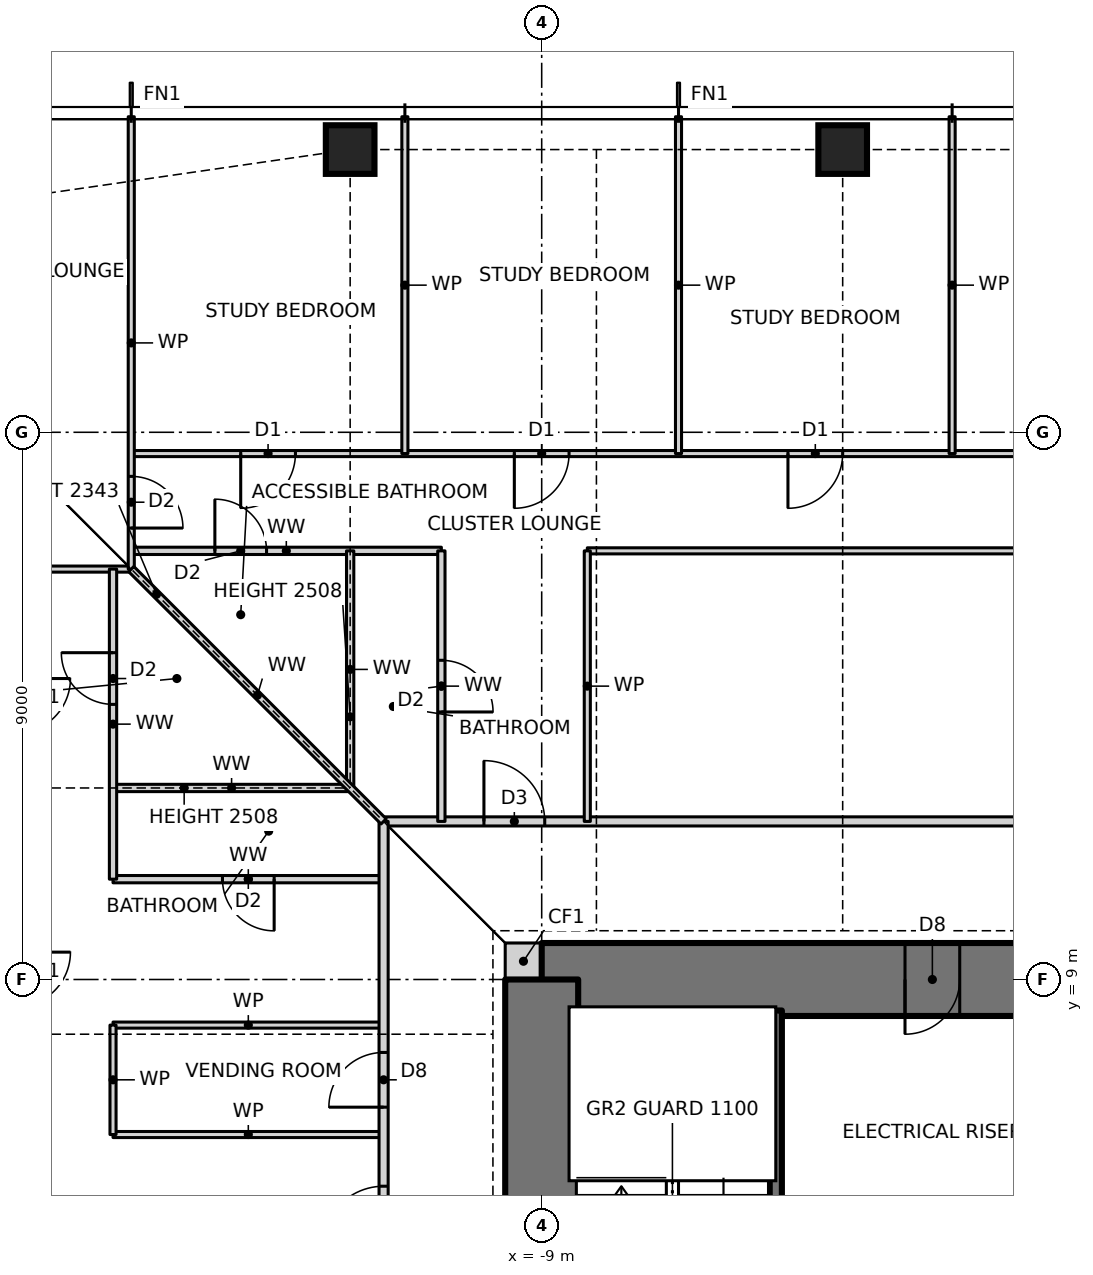
"""IFC4 building model, lengths in metres.
Left out: names, types, materials, properties, quantities, classifications, styles, units other than length and angle.
Written with IfcOpenShell. Run it as: python <this file> out.ifc"""

import sys

from ifc_helpers import new_model, si_unit, direction, frame, frame_2d, origin, origin_2d, place, context, subcontext, project, spatial, rectangle, hollow_rectangle, extrude, element, fill, save


model = new_model("IFC4")
c1 = context("Model", 3, precision=1e-05, world=origin(), true_north=direction((0.0, 1.0)))
c2 = subcontext(c1, "Body", "Model", "MODEL_VIEW")
j1 = project(units=[si_unit("LENGTHUNIT", "METRE"), si_unit("PLANEANGLEUNIT", "RADIAN")], contexts=[c1])
p1 = place(None, origin())
s1 = spatial("IfcSite", under=j1, at=p1, CompositionType="ELEMENT")
p2 = place(p1, origin())
s2 = spatial("IfcBuilding", under=s1, at=p2, CompositionType="ELEMENT")
p3 = place(p2, frame((0.0, 0.0, 15.0)))
s3 = spatial("IfcBuildingStorey", under=s2, at=p3, CompositionType="ELEMENT", Elevation=15.0)
for number, where, z_axis, x_axis in (
    (1, (-4.05, 22.65, 0.0), (0.0, 0.0, 1.0), (1.0, 0.0, 0.0)),
    (2, (-12.15, 22.65, 0.0), (0.0, 0.0, 1.0), (1.0, 0.0, 0.0)),
):
    element("IfcColumn", number, at=place(p3, frame(where, z_axis=z_axis, x_axis=x_axis)), inside=s3, PredefinedType="COLUMN", context=c2, shape_type="SweptSolid", body=[
        extrude(hollow_rectangle(XDim=0.8, YDim=0.8, WallThickness=0.09, at=origin_2d()), origin(), (0.0, 0.0, 1.0), 3.5),
    ])
p4 = place(p3, frame((-9.6, 9.3, 0.0), z_axis=(0.0, 0.0, 1.0), x_axis=(1.0, 0.0, 0.0)))
e3 = element("IfcWall", 3, at=p4, inside=s3, PredefinedType="SOLIDWALL", context=c2, shape_type="SweptSolid", body=[
    extrude(rectangle(XDim=0.6, YDim=0.6, at=frame_2d((0.3, 0.0))), origin(), (0.0, 0.0, 1.0), 3.5),
])
p5 = place(p3, frame((9.0, 9.0, 0.0), z_axis=(0.0, 0.0, 1.0), x_axis=(-1.0, 0.0, 0.0)))
e4 = element("IfcWall", 4, at=p5, inside=s3, PredefinedType="SHEAR", context=c2, shape_type="SweptSolid", body=[
    extrude(rectangle(XDim=18.0, YDim=1.2, at=frame_2d((9.0, 0.0))), origin(), (0.0, 0.0, 1.0), 3.5),
])
p6 = place(p5, frame((11.125, 0.0, 0.0)))
e5 = element("IfcOpeningElement", 5, at=p6, cuts=e4, PredefinedType="OPENING", context=c2, shape_type="SweptSolid", body=[
    extrude(rectangle(XDim=0.9, YDim=2.1, at=frame_2d((0.45, 1.05))), frame((0.0, 0.61, 0.0), z_axis=(0.0, -1.0, 0.0), x_axis=(1.0, 0.0, 0.0)), (0.0, 0.0, 1.0), 1.22),
])
p7 = place(p5, frame((4.275, 0.0, 0.0)))
e6 = element("IfcOpeningElement", 6, at=p7, cuts=e4, PredefinedType="OPENING", context=c2, shape_type="SweptSolid", body=[
    extrude(rectangle(XDim=0.9, YDim=2.1, at=frame_2d((0.45, 1.05))), frame((0.0, 0.61, 0.0), z_axis=(0.0, -1.0, 0.0), x_axis=(1.0, 0.0, 0.0)), (0.0, 0.0, 1.0), 1.22),
])
p8 = place(p3, frame((-9.0, 9.0, 0.0), z_axis=(0.0, 0.0, 1.0), x_axis=(0.0, -1.0, 0.0)))
e7 = element("IfcWall", 7, at=p8, inside=s3, PredefinedType="SHEAR", context=c2, shape_type="SweptSolid", body=[
    extrude(rectangle(XDim=18.0, YDim=1.2, at=frame_2d((9.0, 0.0))), origin(), (0.0, 0.0, 1.0), 3.5),
])
p9 = place(p8, frame((8.5, 0.0, 0.0)))
e8 = element("IfcOpeningElement", 8, at=p9, cuts=e7, PredefinedType="OPENING", context=c2, shape_type="SweptSolid", body=[
    extrude(rectangle(XDim=1.0, YDim=2.1, at=frame_2d((0.5, 1.05))), frame((0.0, 0.61, 0.0), z_axis=(0.0, -1.0, 0.0), x_axis=(1.0, 0.0, 0.0)), (0.0, 0.0, 1.0), 1.22),
])
for number, where, z_axis, x_axis in (
    (9, (-16.05, 6.45, 0.0), (0.0, 0.0, 1.0), (1.0, 0.0, 0.0)),
    (10, (-16.05, 8.25, 0.0), (0.0, 0.0, 1.0), (1.0, 0.0, 0.0)),
):
    element("IfcWall", number, at=place(p3, frame(where, z_axis=z_axis, x_axis=x_axis)), inside=s3, PredefinedType="PARTITIONING", context=c2, shape_type="SweptSolid", body=[
        extrude(rectangle(XDim=4.45, YDim=0.1, at=frame_2d((2.225, 0.0))), origin(), (0.0, 0.0, 1.0), 3.27),
    ])
p10 = place(p3, frame((-16.05, 10.65, 0.0), z_axis=(0.0, 0.0, 1.0), x_axis=(1.0, 0.0, 0.0)))
e11 = element("IfcWall", 11, at=p10, inside=s3, PredefinedType="PARTITIONING", context=c2, shape_type="SweptSolid", body=[
    extrude(rectangle(XDim=4.45, YDim=0.12, at=frame_2d((2.225, 0.0))), origin(), (0.0, 0.0, 1.0), 3.27),
])
p11 = place(p10, frame((1.8, 0.0, 0.0)))
e12 = element("IfcOpeningElement", 12, at=p11, cuts=e11, PredefinedType="OPENING", context=c2, shape_type="SweptSolid", body=[
    extrude(rectangle(XDim=0.85, YDim=2.1, at=frame_2d((0.425, 1.05))), frame((0.0, 0.07, 0.0), z_axis=(0.0, -1.0, 0.0), x_axis=(1.0, 0.0, 0.0)), (0.0, 0.0, 1.0), 0.14),
])
p12 = place(p3, frame((-11.6, 11.6, 0.0), z_axis=(0.0, 0.0, 1.0), x_axis=(1.0, 0.0, 0.0)))
e13 = element("IfcWall", 13, at=p12, inside=s3, PredefinedType="PARTITIONING", context=c2, shape_type="SweptSolid", body=[
    extrude(rectangle(XDim=23.2, YDim=0.15, at=frame_2d((11.6, 0.0))), origin(), (0.0, 0.0, 1.0), 3.27),
])
p13 = place(p12, frame((1.65, 0.0, 0.0)))
e14 = element("IfcOpeningElement", 14, at=p13, cuts=e13, PredefinedType="OPENING", context=c2, shape_type="SweptSolid", body=[
    extrude(rectangle(XDim=1.0, YDim=2.1, at=frame_2d((0.5, 1.05))), frame((0.0, 0.085, 0.0), z_axis=(0.0, -1.0, 0.0), x_axis=(1.0, 0.0, 0.0)), (0.0, 0.0, 1.0), 0.17),
])
p14 = place(p3, frame((-16.05, 12.15, 0.0), z_axis=(0.0, 0.0, 1.0), x_axis=(1.0, 0.0, 0.0)))
e15 = element("IfcWall", 15, at=p14, inside=s3, PredefinedType="PARTITIONING", context=c2, shape_type="SweptSolid", body=[
    extrude(rectangle(XDim=3.9, YDim=0.12, at=frame_2d((1.95, 0.0))), origin(), (0.0, 0.0, 1.0), 2.508),
])
p15 = place(p3, frame((-23.19, 15.75, 0.0), z_axis=(0.0, 0.0, 1.0), x_axis=(1.0, 0.0, 0.0)))
e16 = element("IfcWall", 16, at=p15, inside=s3, PredefinedType="PARTITIONING", context=c2, shape_type="SweptSolid", body=[
    extrude(rectangle(XDim=7.44, YDim=0.1, at=frame_2d((3.72, 0.0))), origin(), (0.0, 0.0, 1.0), 3.27),
])
p16 = place(p3, frame((-15.75, 16.05, 0.0), z_axis=(0.0, 0.0, 1.0), x_axis=(1.0, 0.0, 0.0)))
e17 = element("IfcWall", 17, at=p16, inside=s3, PredefinedType="PARTITIONING", context=c2, shape_type="SweptSolid", body=[
    extrude(rectangle(XDim=5.1, YDim=0.12, at=frame_2d((2.55, 0.0))), origin(), (0.0, 0.0, 1.0), 3.27),
])
p17 = place(p16, frame((1.375, 0.0, 0.0)))
e18 = element("IfcOpeningElement", 18, at=p17, cuts=e17, PredefinedType="OPENING", context=c2, shape_type="SweptSolid", body=[
    extrude(rectangle(XDim=0.85, YDim=2.1, at=frame_2d((0.425, 1.05))), frame((0.0, 0.07, 0.0), z_axis=(0.0, -1.0, 0.0), x_axis=(1.0, 0.0, 0.0)), (0.0, 0.0, 1.0), 0.14),
])
p18 = place(p3, frame((-8.25, 16.05, 0.0), z_axis=(0.0, 0.0, 1.0), x_axis=(1.0, 0.0, 0.0)))
e19 = element("IfcWall", 19, at=p18, inside=s3, PredefinedType="PARTITIONING", context=c2, shape_type="SweptSolid", body=[
    extrude(rectangle(XDim=20.2, YDim=0.1, at=frame_2d((10.1, 0.0))), origin(), (0.0, 0.0, 1.0), 3.27),
])
p19 = place(p18, frame((9.675, 0.0, 0.0)))
e20 = element("IfcOpeningElement", 20, at=p19, cuts=e19, PredefinedType="OPENING", context=c2, shape_type="SweptSolid", body=[
    extrude(rectangle(XDim=0.85, YDim=2.1, at=frame_2d((0.425, 1.05))), frame((0.0, 0.06, 0.0), z_axis=(0.0, -1.0, 0.0), x_axis=(1.0, 0.0, 0.0)), (0.0, 0.0, 1.0), 0.12),
])
p20 = place(p3, frame((-15.75, 17.65, 0.0), z_axis=(0.0, 0.0, 1.0), x_axis=(1.0, 0.0, 0.0)))
e21 = element("IfcWall", 21, at=p20, inside=s3, PredefinedType="PARTITIONING", context=c2, shape_type="SweptSolid", body=[
    extrude(rectangle(XDim=31.5, YDim=0.1, at=frame_2d((15.75, 0.0))), origin(), (0.0, 0.0, 1.0), 3.27),
])
p21 = place(p20, frame((28.8, 0.0, 0.0)))
e22 = element("IfcOpeningElement", 22, at=p21, cuts=e21, PredefinedType="OPENING", context=c2, shape_type="SweptSolid", body=[
    extrude(rectangle(XDim=0.9, YDim=2.1, at=frame_2d((0.45, 1.05))), frame((0.0, 0.06, 0.0), z_axis=(0.0, -1.0, 0.0), x_axis=(1.0, 0.0, 0.0)), (0.0, 0.0, 1.0), 0.12),
])
p22 = place(p20, frame((24.3, 0.0, 0.0)))
e23 = element("IfcOpeningElement", 23, at=p22, cuts=e21, PredefinedType="OPENING", context=c2, shape_type="SweptSolid", body=[
    extrude(rectangle(XDim=0.9, YDim=2.1, at=frame_2d((0.45, 1.05))), frame((0.0, 0.06, 0.0), z_axis=(0.0, -1.0, 0.0), x_axis=(1.0, 0.0, 0.0)), (0.0, 0.0, 1.0), 0.12),
])
p23 = place(p20, frame((19.8, 0.0, 0.0)))
e24 = element("IfcOpeningElement", 24, at=p23, cuts=e21, PredefinedType="OPENING", context=c2, shape_type="SweptSolid", body=[
    extrude(rectangle(XDim=0.9, YDim=2.1, at=frame_2d((0.45, 1.05))), frame((0.0, 0.06, 0.0), z_axis=(0.0, -1.0, 0.0), x_axis=(1.0, 0.0, 0.0)), (0.0, 0.0, 1.0), 0.12),
])
p24 = place(p20, frame((15.3, 0.0, 0.0)))
e25 = element("IfcOpeningElement", 25, at=p24, cuts=e21, PredefinedType="OPENING", context=c2, shape_type="SweptSolid", body=[
    extrude(rectangle(XDim=0.9, YDim=2.1, at=frame_2d((0.45, 1.05))), frame((0.0, 0.06, 0.0), z_axis=(0.0, -1.0, 0.0), x_axis=(1.0, 0.0, 0.0)), (0.0, 0.0, 1.0), 0.12),
])
p25 = place(p20, frame((10.8, 0.0, 0.0)))
e26 = element("IfcOpeningElement", 26, at=p25, cuts=e21, PredefinedType="OPENING", context=c2, shape_type="SweptSolid", body=[
    extrude(rectangle(XDim=0.9, YDim=2.1, at=frame_2d((0.45, 1.05))), frame((0.0, 0.06, 0.0), z_axis=(0.0, -1.0, 0.0), x_axis=(1.0, 0.0, 0.0)), (0.0, 0.0, 1.0), 0.12),
])
p26 = place(p20, frame((6.3, 0.0, 0.0)))
e27 = element("IfcOpeningElement", 27, at=p26, cuts=e21, PredefinedType="OPENING", context=c2, shape_type="SweptSolid", body=[
    extrude(rectangle(XDim=0.9, YDim=2.1, at=frame_2d((0.45, 1.05))), frame((0.0, 0.06, 0.0), z_axis=(0.0, -1.0, 0.0), x_axis=(1.0, 0.0, 0.0)), (0.0, 0.0, 1.0), 0.12),
])
p27 = place(p20, frame((1.8, 0.0, 0.0)))
e28 = element("IfcOpeningElement", 28, at=p27, cuts=e21, PredefinedType="OPENING", context=c2, shape_type="SweptSolid", body=[
    extrude(rectangle(XDim=0.9, YDim=2.1, at=frame_2d((0.45, 1.05))), frame((0.0, 0.06, 0.0), z_axis=(0.0, -1.0, 0.0), x_axis=(1.0, 0.0, 0.0)), (0.0, 0.0, 1.0), 0.12),
])
p28 = place(p3, frame((-2.25, 17.65, 0.0), z_axis=(0.0, 0.0, 1.0), x_axis=(0.0, 1.0, 0.0)))
e29 = element("IfcWall", 29, at=p28, inside=s3, PredefinedType="PARTITIONING", context=c2, shape_type="SweptSolid", body=[
    extrude(rectangle(XDim=5.54, YDim=0.1, at=frame_2d((2.77, 0.0))), origin(), (0.0, 0.0, 1.0), 3.27),
])
p29 = place(p3, frame((-5.15, 1.6, 0.0), z_axis=(0.0, 0.0, 1.0), x_axis=(0.0, 1.0, 0.0)))
e30 = element("IfcWall", 30, at=p29, inside=s3, PredefinedType="SOLIDWALL", context=c2, shape_type="SweptSolid", body=[
    extrude(rectangle(XDim=6.89, YDim=0.2, at=frame_2d((3.445, 0.0))), origin(), (0.0, 0.0, 1.0), 3.5),
])
p30 = place(p3, frame((-6.75, 17.65, 0.0), z_axis=(0.0, 0.0, 1.0), x_axis=(0.0, 1.0, 0.0)))
e31 = element("IfcWall", 31, at=p30, inside=s3, PredefinedType="PARTITIONING", context=c2, shape_type="SweptSolid", body=[
    extrude(rectangle(XDim=5.54, YDim=0.1, at=frame_2d((2.77, 0.0))), origin(), (0.0, 0.0, 1.0), 3.27),
])
p31 = place(p3, frame((-8.25, 11.6, 0.0), z_axis=(0.0, 0.0, 1.0), x_axis=(0.0, 1.0, 0.0)))
e32 = element("IfcWall", 32, at=p31, inside=s3, PredefinedType="PARTITIONING", context=c2, shape_type="SweptSolid", body=[
    extrude(rectangle(XDim=4.45, YDim=0.1, at=frame_2d((2.225, 0.0))), origin(), (0.0, 0.0, 1.0), 3.27),
])
p32 = place(p3, frame((-10.65, 11.6, 0.0), z_axis=(0.0, 0.0, 1.0), x_axis=(0.0, 1.0, 0.0)))
e33 = element("IfcWall", 33, at=p32, inside=s3, PredefinedType="PARTITIONING", context=c2, shape_type="SweptSolid", body=[
    extrude(rectangle(XDim=4.45, YDim=0.12, at=frame_2d((2.225, 0.0))), origin(), (0.0, 0.0, 1.0), 3.27),
])
p33 = place(p32, frame((1.8, 0.0, 0.0)))
e34 = element("IfcOpeningElement", 34, at=p33, cuts=e33, PredefinedType="OPENING", context=c2, shape_type="SweptSolid", body=[
    extrude(rectangle(XDim=0.85, YDim=2.1, at=frame_2d((0.425, 1.05))), frame((0.0, 0.07, 0.0), z_axis=(0.0, -1.0, 0.0), x_axis=(1.0, 0.0, 0.0)), (0.0, 0.0, 1.0), 0.14),
])
p34 = place(p3, frame((-11.25, 17.65, 0.0), z_axis=(0.0, 0.0, 1.0), x_axis=(0.0, 1.0, 0.0)))
e35 = element("IfcWall", 35, at=p34, inside=s3, PredefinedType="PARTITIONING", context=c2, shape_type="SweptSolid", body=[
    extrude(rectangle(XDim=5.54, YDim=0.1, at=frame_2d((2.77, 0.0))), origin(), (0.0, 0.0, 1.0), 3.27),
])
p35 = place(p3, frame((-11.6, -12.6, 0.0), z_axis=(0.0, 0.0, 1.0), x_axis=(0.0, 1.0, 0.0)))
e36 = element("IfcWall", 36, at=p35, inside=s3, PredefinedType="PARTITIONING", context=c2, shape_type="SweptSolid", body=[
    extrude(rectangle(XDim=24.2, YDim=0.15, at=frame_2d((12.1, 0.0))), origin(), (0.0, 0.0, 1.0), 3.27),
])
p36 = place(p35, frame((17.2, 0.0, 0.0)))
e37 = element("IfcOpeningElement", 37, at=p36, cuts=e36, PredefinedType="OPENING", context=c2, shape_type="SweptSolid", body=[
    extrude(rectangle(XDim=1.0, YDim=2.1, at=frame_2d((0.5, 1.05))), frame((0.0, 0.085, 0.0), z_axis=(0.0, -1.0, 0.0), x_axis=(1.0, 0.0, 0.0)), (0.0, 0.0, 1.0), 0.17),
])
p37 = place(p35, frame((19.5, 0.0, 0.0)))
e38 = element("IfcOpeningElement", 38, at=p37, cuts=e36, PredefinedType="OPENING", context=c2, shape_type="SweptSolid", body=[
    extrude(rectangle(XDim=0.9, YDim=2.1, at=frame_2d((0.45, 1.05))), frame((0.0, 0.085, 0.0), z_axis=(0.0, -1.0, 0.0), x_axis=(1.0, 0.0, 0.0)), (0.0, 0.0, 1.0), 0.17),
])
p38 = place(p3, frame((-12.15, 12.15, 0.0), z_axis=(0.0, 0.0, 1.0), x_axis=(0.0, 1.0, 0.0)))
e39 = element("IfcWall", 39, at=p38, inside=s3, PredefinedType="PARTITIONING", context=c2, shape_type="SweptSolid", body=[
    extrude(rectangle(XDim=3.9, YDim=0.12, at=frame_2d((1.95, 0.0))), origin(), (0.0, 0.0, 1.0), 2.508),
])
p39 = place(p3, frame((-15.75, 15.75, 0.0), z_axis=(0.0, 0.0, 1.0), x_axis=(0.0, 1.0, 0.0)))
e40 = element("IfcWall", 40, at=p39, inside=s3, PredefinedType="PARTITIONING", context=c2, shape_type="SweptSolid", body=[
    extrude(rectangle(XDim=7.44, YDim=0.1, at=frame_2d((3.72, 0.0))), origin(), (0.0, 0.0, 1.0), 3.27),
])
p40 = place(p39, frame((0.675, 0.0, 0.0)))
e41 = element("IfcOpeningElement", 41, at=p40, cuts=e40, PredefinedType="OPENING", context=c2, shape_type="SweptSolid", body=[
    extrude(rectangle(XDim=0.85, YDim=2.1, at=frame_2d((0.425, 1.05))), frame((0.0, 0.06, 0.0), z_axis=(0.0, -1.0, 0.0), x_axis=(1.0, 0.0, 0.0)), (0.0, 0.0, 1.0), 0.12),
])
p41 = place(p3, frame((-16.05, 6.45, 0.0), z_axis=(0.0, 0.0, 1.0), x_axis=(0.0, 1.0, 0.0)))
e42 = element("IfcWall", 42, at=p41, inside=s3, PredefinedType="PARTITIONING", context=c2, shape_type="SweptSolid", body=[
    extrude(rectangle(XDim=1.8, YDim=0.1, at=frame_2d((0.9, 0.0))), origin(), (0.0, 0.0, 1.0), 3.27),
])
p42 = place(p3, frame((-16.05, 10.65, 0.0), z_axis=(0.0, 0.0, 1.0), x_axis=(0.0, 1.0, 0.0)))
e43 = element("IfcWall", 43, at=p42, inside=s3, PredefinedType="PARTITIONING", context=c2, shape_type="SweptSolid", body=[
    extrude(rectangle(XDim=5.1, YDim=0.12, at=frame_2d((2.55, 0.0))), origin(), (0.0, 0.0, 1.0), 3.27),
])
p43 = place(p42, frame((2.875, 0.0, 0.0)))
e44 = element("IfcOpeningElement", 44, at=p43, cuts=e43, PredefinedType="OPENING", context=c2, shape_type="SweptSolid", body=[
    extrude(rectangle(XDim=0.85, YDim=2.1, at=frame_2d((0.425, 1.05))), frame((0.0, 0.07, 0.0), z_axis=(0.0, -1.0, 0.0), x_axis=(1.0, 0.0, 0.0)), (0.0, 0.0, 1.0), 0.14),
])
p44 = place(p3, frame((-11.6, 11.6, 0.0), z_axis=(0.0, 0.0, 1.0), x_axis=(-0.707106781187, 0.707106781187, 0.0)))
e45 = element("IfcWall", 45, at=p44, inside=s3, PredefinedType="PARTITIONING", context=c2, shape_type="SweptSolid", body=[
    extrude(rectangle(XDim=5.869, YDim=0.12, at=frame_2d((2.935, 0.0))), origin(), (0.0, 0.0, 1.0), 2.343),
])
p45 = place(p25, frame((0.9, 0.0, 0.0), z_axis=(0.0, 0.0, 1.0), x_axis=(-1.0, 0.0, 0.0)))
e46 = element("IfcDoor", 46, at=p45, inside=s3, OperationType="SINGLE_SWING_RIGHT", PredefinedType="DOOR", context=c2, shape_type="SweptSolid", body=[
    extrude(rectangle(XDim=0.9, YDim=2.1, at=frame_2d((0.45, 1.05))), frame((0.0, 0.025, 0.0), z_axis=(0.0, -1.0, 0.0), x_axis=(1.0, 0.0, 0.0)), (0.0, 0.0, 1.0), 0.05),
])
fill(e26, e46)
p46 = place(p26, frame((0.9, 0.0, 0.0), z_axis=(0.0, 0.0, 1.0), x_axis=(-1.0, 0.0, 0.0)))
e47 = element("IfcDoor", 47, at=p46, inside=s3, OperationType="SINGLE_SWING_RIGHT", PredefinedType="DOOR", context=c2, shape_type="SweptSolid", body=[
    extrude(rectangle(XDim=0.9, YDim=2.1, at=frame_2d((0.45, 1.05))), frame((0.0, 0.025, 0.0), z_axis=(0.0, -1.0, 0.0), x_axis=(1.0, 0.0, 0.0)), (0.0, 0.0, 1.0), 0.05),
])
fill(e27, e47)
p47 = place(p27, frame((0.9, 0.0, 0.0), z_axis=(0.0, 0.0, 1.0), x_axis=(-1.0, 0.0, 0.0)))
e48 = element("IfcDoor", 48, at=p47, inside=s3, OperationType="SINGLE_SWING_RIGHT", PredefinedType="DOOR", context=c2, shape_type="SweptSolid", body=[
    extrude(rectangle(XDim=0.9, YDim=2.1, at=frame_2d((0.45, 1.05))), frame((0.0, 0.025, 0.0), z_axis=(0.0, -1.0, 0.0), x_axis=(1.0, 0.0, 0.0)), (0.0, 0.0, 1.0), 0.05),
])
fill(e28, e48)
p48 = place(p13, origin())
e49 = element("IfcDoor", 49, at=p48, inside=s3, OperationType="SINGLE_SWING_LEFT", PredefinedType="DOOR", context=c2, shape_type="SweptSolid", body=[
    extrude(rectangle(XDim=1.0, YDim=2.1, at=frame_2d((0.5, 1.05))), frame((0.0, 0.025, 0.0), z_axis=(0.0, -1.0, 0.0), x_axis=(1.0, 0.0, 0.0)), (0.0, 0.0, 1.0), 0.05),
])
fill(e14, e49)
p49 = place(p33, frame((0.85, 0.0, 0.0), z_axis=(0.0, 0.0, 1.0), x_axis=(-1.0, 0.0, 0.0)))
e50 = element("IfcDoor", 50, at=p49, inside=s3, OperationType="SINGLE_SWING_RIGHT", PredefinedType="DOOR", context=c2, shape_type="SweptSolid", body=[
    extrude(rectangle(XDim=0.85, YDim=2.1, at=frame_2d((0.425, 1.05))), frame((0.0, 0.025, 0.0), z_axis=(0.0, -1.0, 0.0), x_axis=(1.0, 0.0, 0.0)), (0.0, 0.0, 1.0), 0.05),
])
fill(e34, e50)
p50 = place(p17, origin())
e51 = element("IfcDoor", 51, at=p50, inside=s3, OperationType="SINGLE_SWING_LEFT", PredefinedType="DOOR", context=c2, shape_type="SweptSolid", body=[
    extrude(rectangle(XDim=0.85, YDim=2.1, at=frame_2d((0.425, 1.05))), frame((0.0, 0.025, 0.0), z_axis=(0.0, -1.0, 0.0), x_axis=(1.0, 0.0, 0.0)), (0.0, 0.0, 1.0), 0.05),
])
fill(e18, e51)
p51 = place(p36, origin())
e52 = element("IfcDoor", 52, at=p51, inside=s3, OperationType="SINGLE_SWING_LEFT", PredefinedType="DOOR", context=c2, shape_type="SweptSolid", body=[
    extrude(rectangle(XDim=1.0, YDim=2.1, at=frame_2d((0.5, 1.05))), frame((0.0, 0.025, 0.0), z_axis=(0.0, -1.0, 0.0), x_axis=(1.0, 0.0, 0.0)), (0.0, 0.0, 1.0), 0.05),
])
fill(e37, e52)
p52 = place(p43, origin())
e53 = element("IfcDoor", 53, at=p52, inside=s3, OperationType="SINGLE_SWING_RIGHT", PredefinedType="DOOR", context=c2, shape_type="SweptSolid", body=[
    extrude(rectangle(XDim=0.85, YDim=2.1, at=frame_2d((0.425, 1.05))), frame((0.0, 0.025, 0.0), z_axis=(0.0, -1.0, 0.0), x_axis=(1.0, 0.0, 0.0)), (0.0, 0.0, 1.0), 0.05),
])
fill(e44, e53)
p53 = place(p11, frame((0.85, 0.0, 0.0), z_axis=(0.0, 0.0, 1.0), x_axis=(-1.0, 0.0, 0.0)))
e54 = element("IfcDoor", 54, at=p53, inside=s3, OperationType="SINGLE_SWING_LEFT", PredefinedType="DOOR", context=c2, shape_type="SweptSolid", body=[
    extrude(rectangle(XDim=0.85, YDim=2.1, at=frame_2d((0.425, 1.05))), frame((0.0, 0.025, 0.0), z_axis=(0.0, -1.0, 0.0), x_axis=(1.0, 0.0, 0.0)), (0.0, 0.0, 1.0), 0.05),
])
fill(e12, e54)
p54 = place(p37, origin())
e55 = element("IfcDoor", 55, at=p54, inside=s3, OperationType="SINGLE_SWING_LEFT", PredefinedType="DOOR", context=c2, shape_type="SweptSolid", body=[
    extrude(rectangle(XDim=0.9, YDim=2.1, at=frame_2d((0.45, 1.05))), frame((0.0, 0.025, 0.0), z_axis=(0.0, -1.0, 0.0), x_axis=(1.0, 0.0, 0.0)), (0.0, 0.0, 1.0), 0.05),
])
fill(e38, e55)
p55 = place(p40, frame((0.85, 0.0, 0.0), z_axis=(0.0, 0.0, 1.0), x_axis=(-1.0, 0.0, 0.0)))
e56 = element("IfcDoor", 56, at=p55, inside=s3, OperationType="SINGLE_SWING_RIGHT", PredefinedType="DOOR", context=c2, shape_type="SweptSolid", body=[
    extrude(rectangle(XDim=0.85, YDim=2.1, at=frame_2d((0.425, 1.05))), frame((0.0, 0.025, 0.0), z_axis=(0.0, -1.0, 0.0), x_axis=(1.0, 0.0, 0.0)), (0.0, 0.0, 1.0), 0.05),
])
fill(e41, e56)
p56 = place(p6, origin())
e57 = element("IfcDoor", 57, at=p56, inside=s3, OperationType="SINGLE_SWING_RIGHT", PredefinedType="DOOR", context=c2, shape_type="SweptSolid", body=[
    extrude(rectangle(XDim=0.9, YDim=2.1, at=frame_2d((0.45, 1.05))), frame((0.0, 0.025, 0.0), z_axis=(0.0, -1.0, 0.0), x_axis=(1.0, 0.0, 0.0)), (0.0, 0.0, 1.0), 0.05),
])
fill(e5, e57)
save(model, sys.argv[1])
